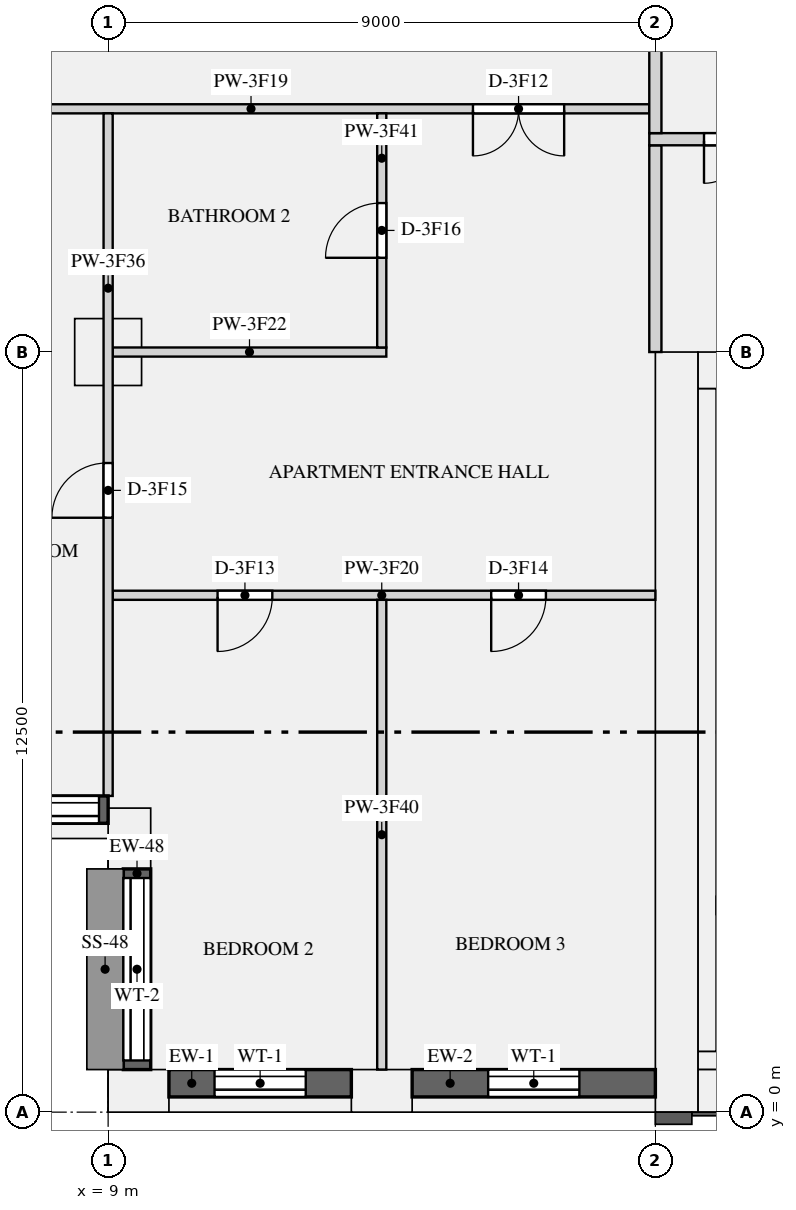
"""IFC4 building model, lengths in metres.
Left out: names, types, materials, properties, quantities, classifications, styles, units other than length and angle.
Written with IfcOpenShell. Run it as: python <this file> out.ifc"""

import sys

from ifc_helpers import new_model, si_unit, direction, frame, frame_2d, origin, origin_2d, place, context, subcontext, project, spatial, rectangle, extrude, element, fill, save


model = new_model("IFC4")
c1 = context("Model", 3, precision=1e-05, world=origin(), true_north=direction((0.0, 1.0)))
c2 = subcontext(c1, "Body", "Model", "MODEL_VIEW")
j1 = project(units=[si_unit("LENGTHUNIT", "METRE"), si_unit("PLANEANGLEUNIT", "RADIAN")], contexts=[c1])
p1 = place(None, origin())
s1 = spatial("IfcSite", under=j1, at=p1, CompositionType="ELEMENT")
p2 = place(p1, origin())
s2 = spatial("IfcBuilding", under=s1, at=p2, CompositionType="ELEMENT")
p3 = place(p2, frame((0.0, 0.0, 179.1)))
s3 = spatial("IfcBuildingStorey", under=s2, at=p3, CompositionType="ELEMENT", Elevation=179.1)
for number, where, z_axis, x_axis in (
    (1, (9.5, 0.35, 0.0), (0.0, 0.0, 1.0), (1.0, 0.0, 0.0)),
    (2, (13.5, 0.35, 0.0), (0.0, 0.0, 1.0), (1.0, 0.0, 0.0)),
    (3, (9.35, 4.5, 0.0), (0.0, 0.0, 1.0), (0.0, -1.0, 0.0)),
):
    element("IfcColumn", number, at=place(p3, frame(where, z_axis=z_axis, x_axis=x_axis)), inside=s3, PredefinedType="USERDEFINED", context=c2, shape_type="SweptSolid", body=[
        extrude(rectangle(XDim=1.0, YDim=0.7, at=origin_2d()), origin(), (0.0, 0.0, 1.0), 3.15),
    ])
p4 = place(p3, frame((9.0, 12.5, 0.0), z_axis=(0.0, 0.0, 1.0), x_axis=(1.0, 0.0, 0.0)))
e4 = element("IfcColumn", 4, at=p4, inside=s3, PredefinedType="COLUMN", context=c2, shape_type="SweptSolid", body=[
    extrude(rectangle(XDim=1.1, YDim=1.1, at=origin_2d()), origin(), (0.0, 0.0, 1.0), 3.15),
])
p5 = place(p3, frame((18.35, 0.0, 0.0), z_axis=(0.0, 0.0, 1.0), x_axis=(0.0, 1.0, 0.0)))
e5 = element("IfcWall", 5, at=p5, inside=s3, PredefinedType="SHEAR", context=c2, shape_type="SweptSolid", body=[
    extrude(rectangle(XDim=12.5, YDim=0.7, at=frame_2d((6.25, 0.0))), origin(), (0.0, 0.0, 1.0), 3.15),
])
p6 = place(p3, frame((18.7, 0.35, 0.0), z_axis=(0.0, 0.0, 1.0), x_axis=(1.0, 0.0, 0.0)))
e6 = element("IfcWall", 6, at=p6, inside=s3, PredefinedType="SHEAR", context=c2, shape_type="SweptSolid", body=[
    extrude(rectangle(XDim=34.6, YDim=0.7, at=frame_2d((17.3, 0.0))), origin(), (0.0, 0.0, 1.0), 3.15),
])
p7 = place(p3, frame((18.7, 12.2, 0.0), z_axis=(0.0, 0.0, 1.0), x_axis=(1.0, 0.0, 0.0)))
e7 = element("IfcWall", 7, at=p7, inside=s3, PredefinedType="SHEAR", context=c2, shape_type="SweptSolid", body=[
    extrude(rectangle(XDim=34.6, YDim=0.6, at=frame_2d((17.3, 0.0))), origin(), (0.0, 0.0, 1.0), 3.15),
])
p8 = place(p7, frame((24.475, 0.0, 0.0)))
e8 = element("IfcOpeningElement", 8, at=p8, cuts=e7, PredefinedType="OPENING", context=c2, shape_type="SweptSolid", body=[
    extrude(rectangle(XDim=1.1, YDim=2.1, at=frame_2d((0.55, 1.05))), frame((0.0, 0.31, 0.0), z_axis=(0.0, -1.0, 0.0), x_axis=(1.0, 0.0, 0.0)), (0.0, 0.0, 1.0), 0.62),
])
p9 = place(p7, frame((26.725, 0.0, 0.0)))
e9 = element("IfcOpeningElement", 9, at=p9, cuts=e7, PredefinedType="OPENING", context=c2, shape_type="SweptSolid", body=[
    extrude(rectangle(XDim=1.1, YDim=2.1, at=frame_2d((0.55, 1.05))), frame((0.0, 0.31, 0.0), z_axis=(0.0, -1.0, 0.0), x_axis=(1.0, 0.0, 0.0)), (0.0, 0.0, 1.0), 0.62),
])
p10 = place(p7, frame((28.975, 0.0, 0.0)))
e10 = element("IfcOpeningElement", 10, at=p10, cuts=e7, PredefinedType="OPENING", context=c2, shape_type="SweptSolid", body=[
    extrude(rectangle(XDim=1.1, YDim=2.1, at=frame_2d((0.55, 1.05))), frame((0.0, 0.31, 0.0), z_axis=(0.0, -1.0, 0.0), x_axis=(1.0, 0.0, 0.0)), (0.0, 0.0, 1.0), 0.62),
])
p11 = place(p7, frame((4.85, 0.0, 0.0)))
e11 = element("IfcOpeningElement", 11, at=p11, cuts=e7, PredefinedType="OPENING", context=c2, shape_type="SweptSolid", body=[
    extrude(rectangle(XDim=0.9, YDim=2.1, at=frame_2d((0.45, 1.05))), frame((0.0, 0.31, 0.0), z_axis=(0.0, -1.0, 0.0), x_axis=(1.0, 0.0, 0.0)), (0.0, 0.0, 1.0), 0.62),
])
p12 = place(p7, frame((11.85, 0.0, 0.0)))
e12 = element("IfcOpeningElement", 12, at=p12, cuts=e7, PredefinedType="OPENING", context=c2, shape_type="SweptSolid", body=[
    extrude(rectangle(XDim=0.9, YDim=2.1, at=frame_2d((0.45, 1.05))), frame((0.0, 0.31, 0.0), z_axis=(0.0, -1.0, 0.0), x_axis=(1.0, 0.0, 0.0)), (0.0, 0.0, 1.0), 0.62),
])
p13 = place(p7, frame((18.35, 0.0, 0.0)))
e13 = element("IfcOpeningElement", 13, at=p13, cuts=e7, PredefinedType="OPENING", context=c2, shape_type="SweptSolid", body=[
    extrude(rectangle(XDim=0.9, YDim=2.1, at=frame_2d((0.45, 1.05))), frame((0.0, 0.31, 0.0), z_axis=(0.0, -1.0, 0.0), x_axis=(1.0, 0.0, 0.0)), (0.0, 0.0, 1.0), 0.62),
])
p14 = place(p7, frame((1.45, 0.0, 0.0)))
e14 = element("IfcOpeningElement", 14, at=p14, cuts=e7, PredefinedType="OPENING", context=c2, shape_type="SweptSolid", body=[
    extrude(rectangle(XDim=1.2, YDim=2.1, at=frame_2d((0.6, 1.05))), frame((0.0, 0.31, 0.0), z_axis=(0.0, -1.0, 0.0), x_axis=(1.0, 0.0, 0.0)), (0.0, 0.0, 1.0), 0.62),
])
p15 = place(p7, frame((31.95, 0.0, 0.0)))
e15 = element("IfcOpeningElement", 15, at=p15, cuts=e7, PredefinedType="OPENING", context=c2, shape_type="SweptSolid", body=[
    extrude(rectangle(XDim=1.2, YDim=2.1, at=frame_2d((0.6, 1.05))), frame((0.0, 0.31, 0.0), z_axis=(0.0, -1.0, 0.0), x_axis=(1.0, 0.0, 0.0)), (0.0, 0.0, 1.0), 0.62),
])
p16 = place(p3, frame((18.85, 1.0, 0.0), z_axis=(0.0, 0.0, 1.0), x_axis=(0.0, 1.0, 0.0)))
e16 = element("IfcWall", 16, at=p16, inside=s3, PredefinedType="SHEAR", context=c2, shape_type="SweptSolid", body=[
    extrude(rectangle(XDim=10.9, YDim=0.3, at=frame_2d((5.45, 0.0))), origin(), (0.0, 0.0, 1.0), 3.15),
])
p17 = place(p3, frame((18.7, 0.85, 0.0), z_axis=(0.0, 0.0, 1.0), x_axis=(1.0, 0.0, 0.0)))
e17 = element("IfcWall", 17, at=p17, inside=s3, PredefinedType="SHEAR", context=c2, shape_type="SweptSolid", body=[
    extrude(rectangle(XDim=34.6, YDim=0.3, at=frame_2d((17.3, 0.0))), origin(), (0.0, 0.0, 1.0), 3.15),
])
p18 = place(p3, frame((19.0, 3.4, 0.0), z_axis=(0.0, 0.0, 1.0), x_axis=(1.0, 0.0, 0.0)))
e18 = element("IfcWall", 18, at=p18, inside=s3, PredefinedType="SHEAR", context=c2, shape_type="SweptSolid", body=[
    extrude(rectangle(XDim=2.55, YDim=0.3, at=frame_2d((1.275, 0.0))), origin(), (0.0, 0.0, 1.0), 3.15),
])
p19 = place(p18, frame((0.675, 0.0, 0.0)))
e19 = element("IfcOpeningElement", 19, at=p19, cuts=e18, PredefinedType="OPENING", context=c2, shape_type="SweptSolid", body=[
    extrude(rectangle(XDim=1.2, YDim=2.1, at=frame_2d((0.6, 1.05))), frame((0.0, 0.16, 0.0), z_axis=(0.0, -1.0, 0.0), x_axis=(1.0, 0.0, 0.0)), (0.0, 0.0, 1.0), 0.32),
])
p20 = place(p3, frame((10.0, 0.475, 0.9), z_axis=(0.0, 0.0, 1.0), x_axis=(1.0, 0.0, 0.0)))
e20 = element("IfcWall", 20, at=p20, inside=s3, PredefinedType="SOLIDWALL", context=c2, shape_type="SweptSolid", body=[
    extrude(rectangle(XDim=3.0, YDim=0.45, at=frame_2d((1.5, 0.0))), origin(), (0.0, 0.0, 1.0), 1.93),
])
p21 = place(p20, frame((0.75, 0.0, 0.15)))
e21 = element("IfcOpeningElement", 21, at=p21, cuts=e20, PredefinedType="OPENING", context=c2, shape_type="SweptSolid", body=[
    extrude(rectangle(XDim=1.5, YDim=1.5, at=frame_2d((0.75, 0.75))), frame((0.0, 0.235, 0.0), z_axis=(0.0, -1.0, 0.0), x_axis=(1.0, 0.0, 0.0)), (0.0, 0.0, 1.0), 0.47),
])
p22 = place(p3, frame((14.0, 0.475, 0.9), z_axis=(0.0, 0.0, 1.0), x_axis=(1.0, 0.0, 0.0)))
e22 = element("IfcWall", 22, at=p22, inside=s3, PredefinedType="SOLIDWALL", context=c2, shape_type="SweptSolid", body=[
    extrude(rectangle(XDim=4.0, YDim=0.45, at=frame_2d((2.0, 0.0))), origin(), (0.0, 0.0, 1.0), 1.93),
])
p23 = place(p22, frame((1.25, 0.0, 0.15)))
e23 = element("IfcOpeningElement", 23, at=p23, cuts=e22, PredefinedType="OPENING", context=c2, shape_type="SweptSolid", body=[
    extrude(rectangle(XDim=1.5, YDim=1.5, at=frame_2d((0.75, 0.75))), frame((0.0, 0.235, 0.0), z_axis=(0.0, -1.0, 0.0), x_axis=(1.0, 0.0, 0.0)), (0.0, 0.0, 1.0), 0.47),
])
p24 = place(p3, frame((5.5, 4.975, 0.9), z_axis=(0.0, 0.0, 1.0), x_axis=(1.0, 0.0, 0.0)))
e24 = element("IfcWall", 24, at=p24, inside=s3, PredefinedType="SOLIDWALL", context=c2, shape_type="SweptSolid", body=[
    extrude(rectangle(XDim=3.5, YDim=0.45, at=frame_2d((1.75, 0.0))), origin(), (0.0, 0.0, 1.0), 1.93),
])
p25 = place(p24, frame((0.15, 0.0, 0.15)))
e25 = element("IfcOpeningElement", 25, at=p25, cuts=e24, PredefinedType="OPENING", context=c2, shape_type="SweptSolid", body=[
    extrude(rectangle(XDim=3.2, YDim=1.5, at=frame_2d((1.6, 0.75))), frame((0.0, 0.235, 0.0), z_axis=(0.0, -1.0, 0.0), x_axis=(1.0, 0.0, 0.0)), (0.0, 0.0, 1.0), 0.47),
])
p26 = place(p3, frame((9.475, 4.0, 0.9), z_axis=(0.0, 0.0, 1.0), x_axis=(0.0, -1.0, 0.0)))
e26 = element("IfcWall", 26, at=p26, inside=s3, PredefinedType="SOLIDWALL", context=c2, shape_type="SweptSolid", body=[
    extrude(rectangle(XDim=3.3, YDim=0.45, at=frame_2d((1.65, 0.0))), origin(), (0.0, 0.0, 1.0), 1.93),
])
p27 = place(p26, frame((0.15, 0.0, 0.15)))
e27 = element("IfcOpeningElement", 27, at=p27, cuts=e26, PredefinedType="OPENING", context=c2, shape_type="SweptSolid", body=[
    extrude(rectangle(XDim=3.0, YDim=1.5, at=frame_2d((1.5, 0.75))), frame((0.0, 0.235, 0.0), z_axis=(0.0, -1.0, 0.0), x_axis=(1.0, 0.0, 0.0)), (0.0, 0.0, 1.0), 0.47),
])
p28 = place(p3, frame((18.0, 12.5, 0.0), z_axis=(0.0, 0.0, 1.0), x_axis=(0.0, 1.0, 0.0)))
e28 = element("IfcWall", 28, at=p28, inside=s3, PredefinedType="PARTITIONING", context=c2, shape_type="SweptSolid", body=[
    extrude(rectangle(XDim=3.4, YDim=0.2, at=frame_2d((1.7, 0.0))), origin(), (0.0, 0.0, 1.0), 2.83),
])
p29 = place(p3, frame((7.7, 16.5, 0.0), z_axis=(0.0, 0.0, 1.0), x_axis=(1.0, 0.0, 0.0)))
e29 = element("IfcWall", 29, at=p29, inside=s3, PredefinedType="PARTITIONING", context=c2, shape_type="SweptSolid", body=[
    extrude(rectangle(XDim=10.2, YDim=0.15, at=frame_2d((5.1, 0.0))), origin(), (0.0, 0.0, 1.0), 2.83),
])
p30 = place(p29, frame((7.3, 0.0, 0.0)))
e30 = element("IfcOpeningElement", 30, at=p30, cuts=e29, PredefinedType="OPENING", context=c2, shape_type="SweptSolid", body=[
    extrude(rectangle(XDim=1.5, YDim=2.1, at=frame_2d((0.75, 1.05))), frame((0.0, 0.085, 0.0), z_axis=(0.0, -1.0, 0.0), x_axis=(1.0, 0.0, 0.0)), (0.0, 0.0, 1.0), 0.17),
])
p31 = place(p3, frame((9.075, 8.5, 0.0), z_axis=(0.0, 0.0, 1.0), x_axis=(1.0, 0.0, 0.0)))
e31 = element("IfcWall", 31, at=p31, inside=s3, PredefinedType="PARTITIONING", context=c2, shape_type="SweptSolid", body=[
    extrude(rectangle(XDim=8.925, YDim=0.15, at=frame_2d((4.462, 0.0))), origin(), (0.0, 0.0, 1.0), 2.83),
])
p32 = place(p31, frame((1.725, 0.0, 0.0)))
e32 = element("IfcOpeningElement", 32, at=p32, cuts=e31, PredefinedType="OPENING", context=c2, shape_type="SweptSolid", body=[
    extrude(rectangle(XDim=0.9, YDim=2.1, at=frame_2d((0.45, 1.05))), frame((0.0, 0.085, 0.0), z_axis=(0.0, -1.0, 0.0), x_axis=(1.0, 0.0, 0.0)), (0.0, 0.0, 1.0), 0.17),
])
p33 = place(p31, frame((6.225, 0.0, 0.0)))
e33 = element("IfcOpeningElement", 33, at=p33, cuts=e31, PredefinedType="OPENING", context=c2, shape_type="SweptSolid", body=[
    extrude(rectangle(XDim=0.9, YDim=2.1, at=frame_2d((0.45, 1.05))), frame((0.0, 0.085, 0.0), z_axis=(0.0, -1.0, 0.0), x_axis=(1.0, 0.0, 0.0)), (0.0, 0.0, 1.0), 0.17),
])
p34 = place(p3, frame((9.075, 12.5, 0.0), z_axis=(0.0, 0.0, 1.0), x_axis=(1.0, 0.0, 0.0)))
e34 = element("IfcWall", 34, at=p34, inside=s3, PredefinedType="PARTITIONING", context=c2, shape_type="SweptSolid", body=[
    extrude(rectangle(XDim=4.5, YDim=0.15, at=frame_2d((2.25, 0.0))), origin(), (0.0, 0.0, 1.0), 2.83),
])
p35 = place(p3, frame((17.9, 16.0, 0.0), z_axis=(0.0, 0.0, 1.0), x_axis=(1.0, 0.0, 0.0)))
e35 = element("IfcWall", 35, at=p35, inside=s3, PredefinedType="PARTITIONING", context=c2, shape_type="SweptSolid", body=[
    extrude(rectangle(XDim=36.2, YDim=0.2, at=frame_2d((18.1, 0.0))), origin(), (0.0, 0.0, 1.0), 2.83),
])
p36 = place(p35, frame((0.9, 0.0, 0.0)))
e36 = element("IfcOpeningElement", 36, at=p36, cuts=e35, PredefinedType="OPENING", context=c2, shape_type="SweptSolid", body=[
    extrude(rectangle(XDim=1.4, YDim=2.1, at=frame_2d((0.7, 1.05))), frame((0.0, 0.11, 0.0), z_axis=(0.0, -1.0, 0.0), x_axis=(1.0, 0.0, 0.0)), (0.0, 0.0, 1.0), 0.22),
])
p37 = place(p35, frame((33.9, 0.0, 0.0)))
e37 = element("IfcOpeningElement", 37, at=p37, cuts=e35, PredefinedType="OPENING", context=c2, shape_type="SweptSolid", body=[
    extrude(rectangle(XDim=1.4, YDim=2.1, at=frame_2d((0.7, 1.05))), frame((0.0, 0.11, 0.0), z_axis=(0.0, -1.0, 0.0), x_axis=(1.0, 0.0, 0.0)), (0.0, 0.0, 1.0), 0.22),
])
p38 = place(p3, frame((18.0, 16.1, 0.0), z_axis=(0.0, 0.0, 1.0), x_axis=(0.0, 1.0, 0.0)))
e38 = element("IfcWall", 38, at=p38, inside=s3, PredefinedType="PARTITIONING", context=c2, shape_type="SweptSolid", body=[
    extrude(rectangle(XDim=7.8, YDim=0.2, at=frame_2d((3.9, 0.0))), origin(), (0.0, 0.0, 1.0), 2.83),
])
p39 = place(p3, frame((9.0, 5.2, 0.0), z_axis=(0.0, 0.0, 1.0), x_axis=(0.0, 1.0, 0.0)))
e39 = element("IfcWall", 39, at=p39, inside=s3, PredefinedType="PARTITIONING", context=c2, shape_type="SweptSolid", body=[
    extrude(rectangle(XDim=11.225, YDim=0.15, at=frame_2d((5.613, 0.0))), origin(), (0.0, 0.0, 1.0), 2.83),
])
p40 = place(p39, frame((4.575, 0.0, 0.0)))
e40 = element("IfcOpeningElement", 40, at=p40, cuts=e39, PredefinedType="OPENING", context=c2, shape_type="SweptSolid", body=[
    extrude(rectangle(XDim=0.9, YDim=2.1, at=frame_2d((0.45, 1.05))), frame((0.0, 0.085, 0.0), z_axis=(0.0, -1.0, 0.0), x_axis=(1.0, 0.0, 0.0)), (0.0, 0.0, 1.0), 0.17),
])
p41 = place(p3, frame((13.5, 0.7, 0.0), z_axis=(0.0, 0.0, 1.0), x_axis=(0.0, 1.0, 0.0)))
e41 = element("IfcWall", 41, at=p41, inside=s3, PredefinedType="PARTITIONING", context=c2, shape_type="SweptSolid", body=[
    extrude(rectangle(XDim=7.725, YDim=0.15, at=frame_2d((3.863, 0.0))), origin(), (0.0, 0.0, 1.0), 2.83),
])
p42 = place(p3, frame((13.5, 12.575, 0.0), z_axis=(0.0, 0.0, 1.0), x_axis=(0.0, 1.0, 0.0)))
e42 = element("IfcWall", 42, at=p42, inside=s3, PredefinedType="PARTITIONING", context=c2, shape_type="SweptSolid", body=[
    extrude(rectangle(XDim=3.85, YDim=0.15, at=frame_2d((1.925, 0.0))), origin(), (0.0, 0.0, 1.0), 2.83),
])
p43 = place(p42, frame((1.475, 0.0, 0.0)))
e43 = element("IfcOpeningElement", 43, at=p43, cuts=e42, PredefinedType="OPENING", context=c2, shape_type="SweptSolid", body=[
    extrude(rectangle(XDim=0.9, YDim=2.1, at=frame_2d((0.45, 1.05))), frame((0.0, 0.085, 0.0), z_axis=(0.0, -1.0, 0.0), x_axis=(1.0, 0.0, 0.0)), (0.0, 0.0, 1.0), 0.17),
])
p44 = place(p21, origin())
e44 = element("IfcWindow", 44, at=p44, inside=s3, PartitioningType="SINGLE_PANEL", PredefinedType="WINDOW", context=c2, shape_type="SweptSolid", body=[
    extrude(rectangle(XDim=1.5, YDim=1.5, at=frame_2d((0.75, 0.75))), frame((0.0, -0.065, 0.0), z_axis=(0.0, -1.0, 0.0), x_axis=(1.0, 0.0, 0.0)), (0.0, 0.0, 1.0), 0.06),
])
fill(e21, e44)
p45 = place(p23, origin())
e45 = element("IfcWindow", 45, at=p45, inside=s3, PartitioningType="SINGLE_PANEL", PredefinedType="WINDOW", context=c2, shape_type="SweptSolid", body=[
    extrude(rectangle(XDim=1.5, YDim=1.5, at=frame_2d((0.75, 0.75))), frame((0.0, -0.065, 0.0), z_axis=(0.0, -1.0, 0.0), x_axis=(1.0, 0.0, 0.0)), (0.0, 0.0, 1.0), 0.06),
])
fill(e23, e45)
p46 = place(p25, origin())
e46 = element("IfcWindow", 46, at=p46, inside=s3, PartitioningType="SINGLE_PANEL", PredefinedType="WINDOW", context=c2, shape_type="SweptSolid", body=[
    extrude(rectangle(XDim=3.2, YDim=1.5, at=frame_2d((1.6, 0.75))), frame((0.0, -0.065, 0.0), z_axis=(0.0, -1.0, 0.0), x_axis=(1.0, 0.0, 0.0)), (0.0, 0.0, 1.0), 0.06),
])
fill(e25, e46)
p47 = place(p27, origin())
e47 = element("IfcWindow", 47, at=p47, inside=s3, PartitioningType="SINGLE_PANEL", PredefinedType="WINDOW", context=c2, shape_type="SweptSolid", body=[
    extrude(rectangle(XDim=3.0, YDim=1.5, at=frame_2d((1.5, 0.75))), frame((0.0, -0.065, 0.0), z_axis=(0.0, -1.0, 0.0), x_axis=(1.0, 0.0, 0.0)), (0.0, 0.0, 1.0), 0.06),
])
fill(e27, e47)
p48 = place(p36, frame((1.4, 0.0, 0.0), z_axis=(0.0, 0.0, 1.0), x_axis=(-1.0, 0.0, 0.0)))
e48 = element("IfcDoor", 48, at=p48, inside=s3, OperationType="DOUBLE_DOOR_SINGLE_SWING", PredefinedType="DOOR", context=c2, shape_type="SweptSolid", body=[
    extrude(rectangle(XDim=1.4, YDim=2.1, at=frame_2d((0.7, 1.05))), frame((0.0, 0.025, 0.0), z_axis=(0.0, -1.0, 0.0), x_axis=(1.0, 0.0, 0.0)), (0.0, 0.0, 1.0), 0.05),
])
fill(e36, e48)
p49 = place(p30, frame((1.5, 0.0, 0.0), z_axis=(0.0, 0.0, 1.0), x_axis=(-1.0, 0.0, 0.0)))
e49 = element("IfcDoor", 49, at=p49, inside=s3, OperationType="DOUBLE_DOOR_SINGLE_SWING", PredefinedType="DOOR", context=c2, shape_type="SweptSolid", body=[
    extrude(rectangle(XDim=1.5, YDim=2.1, at=frame_2d((0.75, 1.05))), frame((0.0, 0.025, 0.0), z_axis=(0.0, -1.0, 0.0), x_axis=(1.0, 0.0, 0.0)), (0.0, 0.0, 1.0), 0.05),
])
fill(e30, e49)
p50 = place(p32, frame((0.9, 0.0, 0.0), z_axis=(0.0, 0.0, 1.0), x_axis=(-1.0, 0.0, 0.0)))
e50 = element("IfcDoor", 50, at=p50, inside=s3, OperationType="SINGLE_SWING_RIGHT", PredefinedType="DOOR", context=c2, shape_type="SweptSolid", body=[
    extrude(rectangle(XDim=0.9, YDim=2.1, at=frame_2d((0.45, 1.05))), frame((0.0, 0.025, 0.0), z_axis=(0.0, -1.0, 0.0), x_axis=(1.0, 0.0, 0.0)), (0.0, 0.0, 1.0), 0.05),
])
fill(e32, e50)
p51 = place(p33, frame((0.9, 0.0, 0.0), z_axis=(0.0, 0.0, 1.0), x_axis=(-1.0, 0.0, 0.0)))
e51 = element("IfcDoor", 51, at=p51, inside=s3, OperationType="SINGLE_SWING_RIGHT", PredefinedType="DOOR", context=c2, shape_type="SweptSolid", body=[
    extrude(rectangle(XDim=0.9, YDim=2.1, at=frame_2d((0.45, 1.05))), frame((0.0, 0.025, 0.0), z_axis=(0.0, -1.0, 0.0), x_axis=(1.0, 0.0, 0.0)), (0.0, 0.0, 1.0), 0.05),
])
fill(e33, e51)
p52 = place(p40, origin())
e52 = element("IfcDoor", 52, at=p52, inside=s3, OperationType="SINGLE_SWING_LEFT", PredefinedType="DOOR", context=c2, shape_type="SweptSolid", body=[
    extrude(rectangle(XDim=0.9, YDim=2.1, at=frame_2d((0.45, 1.05))), frame((0.0, 0.025, 0.0), z_axis=(0.0, -1.0, 0.0), x_axis=(1.0, 0.0, 0.0)), (0.0, 0.0, 1.0), 0.05),
])
fill(e40, e52)
p53 = place(p43, origin())
e53 = element("IfcDoor", 53, at=p53, inside=s3, OperationType="SINGLE_SWING_LEFT", PredefinedType="DOOR", context=c2, shape_type="SweptSolid", body=[
    extrude(rectangle(XDim=0.9, YDim=2.1, at=frame_2d((0.45, 1.05))), frame((0.0, 0.025, 0.0), z_axis=(0.0, -1.0, 0.0), x_axis=(1.0, 0.0, 0.0)), (0.0, 0.0, 1.0), 0.05),
])
fill(e43, e53)
save(model, sys.argv[1])
